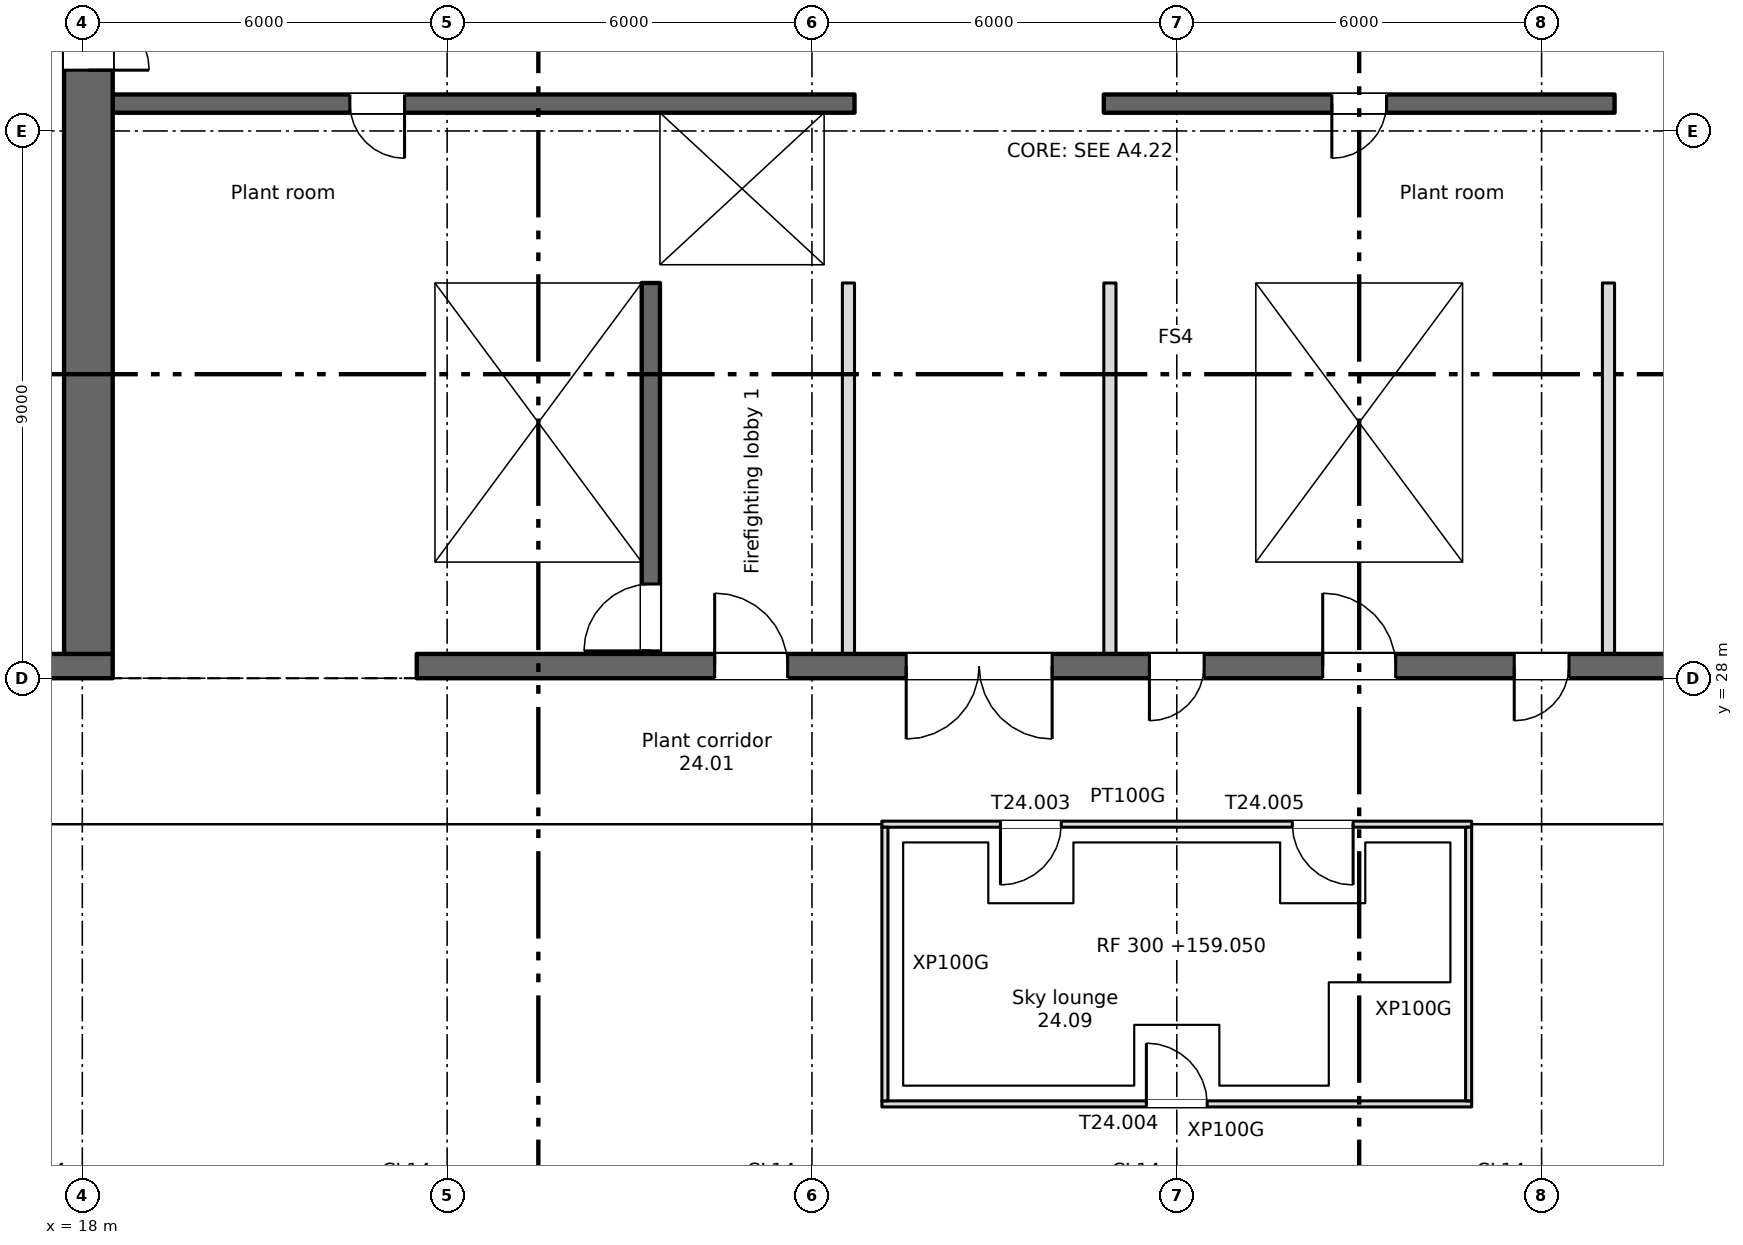
"""IFC4 building model, lengths in metres.
Left out: names, types, materials, properties, quantities, classifications, styles, units other than length and angle.
Written with IfcOpenShell. Run it as: python <this file> out.ifc"""

import sys

from ifc_helpers import new_model, si_unit, direction, frame, frame_2d, origin, place, context, subcontext, project, spatial, rectangle, extrude, element, fill, save


model = new_model("IFC4")
c1 = context("Model", 3, precision=1e-05, world=origin(), true_north=direction((0.0, 1.0)))
c2 = subcontext(c1, "Body", "Model", "MODEL_VIEW")
j1 = project(units=[si_unit("LENGTHUNIT", "METRE"), si_unit("PLANEANGLEUNIT", "RADIAN")], contexts=[c1])
p1 = place(None, origin())
s1 = spatial("IfcSite", under=j1, at=p1, CompositionType="ELEMENT")
p2 = place(p1, origin())
s2 = spatial("IfcBuilding", under=s1, at=p2, CompositionType="ELEMENT")
p3 = place(p2, frame((0.0, 0.0, 158.75)))
s3 = spatial("IfcBuildingStorey", under=s2, at=p3, CompositionType="ELEMENT", Elevation=158.75)
p4 = place(p3, frame((10.0, 28.2, 0.0), z_axis=(0.0, 0.0, 1.0), x_axis=(1.0, 0.0, 0.0)))
e1 = element("IfcWall", 1, at=p4, inside=s3, PredefinedType="SHEAR", context=c2, shape_type="SweptSolid", body=[
    extrude(rectangle(XDim=8.5, YDim=0.4, at=frame_2d((4.25, 0.0))), origin(), (0.0, 0.0, 1.0), 7.2),
])
p5 = place(p4, frame((1.4, 0.0, 0.0)))
e2 = element("IfcOpeningElement", 2, at=p5, cuts=e1, PredefinedType="OPENING", context=c2, shape_type="SweptSolid", body=[
    extrude(rectangle(XDim=1.2, YDim=2.1, at=frame_2d((0.6, 1.05))), frame((0.0, 0.21, 0.0), z_axis=(0.0, -1.0, 0.0), x_axis=(1.0, 0.0, 0.0)), (0.0, 0.0, 1.0), 0.42),
])
p6 = place(p4, frame((4.65, 0.0, 0.0)))
e3 = element("IfcOpeningElement", 3, at=p6, cuts=e1, PredefinedType="OPENING", context=c2, shape_type="SweptSolid", body=[
    extrude(rectangle(XDim=2.4, YDim=2.1, at=frame_2d((1.2, 1.05))), frame((0.0, 0.21, 0.0), z_axis=(0.0, -1.0, 0.0), x_axis=(1.0, 0.0, 0.0)), (0.0, 0.0, 1.0), 0.42),
])
p7 = place(p3, frame((54.5, 28.2, 0.0), z_axis=(0.0, 0.0, 1.0), x_axis=(-1.0, 0.0, 0.0)))
e4 = element("IfcWall", 4, at=p7, inside=s3, PredefinedType="SHEAR", context=c2, shape_type="SweptSolid", body=[
    extrude(rectangle(XDim=31.0, YDim=0.4, at=frame_2d((15.5, 0.0))), origin(), (0.0, 0.0, 1.0), 7.2),
])
p8 = place(p7, frame((14.9, 0.0, 0.0)))
e5 = element("IfcOpeningElement", 5, at=p8, cuts=e4, PredefinedType="OPENING", context=c2, shape_type="SweptSolid", body=[
    extrude(rectangle(XDim=1.2, YDim=2.1, at=frame_2d((0.6, 1.05))), frame((0.0, 0.21, 0.0), z_axis=(0.0, -1.0, 0.0), x_axis=(1.0, 0.0, 0.0)), (0.0, 0.0, 1.0), 0.42),
])
p9 = place(p7, frame((24.9, 0.0, 0.0)))
e6 = element("IfcOpeningElement", 6, at=p9, cuts=e4, PredefinedType="OPENING", context=c2, shape_type="SweptSolid", body=[
    extrude(rectangle(XDim=1.2, YDim=2.1, at=frame_2d((0.6, 1.05))), frame((0.0, 0.21, 0.0), z_axis=(0.0, -1.0, 0.0), x_axis=(1.0, 0.0, 0.0)), (0.0, 0.0, 1.0), 0.42),
])
p10 = place(p7, frame((4.9, 0.0, 0.0)))
e7 = element("IfcOpeningElement", 7, at=p10, cuts=e4, PredefinedType="OPENING", context=c2, shape_type="SweptSolid", body=[
    extrude(rectangle(XDim=1.2, YDim=2.1, at=frame_2d((0.6, 1.05))), frame((0.0, 0.21, 0.0), z_axis=(0.0, -1.0, 0.0), x_axis=(1.0, 0.0, 0.0)), (0.0, 0.0, 1.0), 0.42),
])
p11 = place(p7, frame((20.55, 0.0, 0.0)))
e8 = element("IfcOpeningElement", 8, at=p11, cuts=e4, PredefinedType="OPENING", context=c2, shape_type="SweptSolid", body=[
    extrude(rectangle(XDim=2.4, YDim=2.1, at=frame_2d((1.2, 1.05))), frame((0.0, 0.21, 0.0), z_axis=(0.0, -1.0, 0.0), x_axis=(1.0, 0.0, 0.0)), (0.0, 0.0, 1.0), 0.42),
])
p12 = place(p7, frame((8.05, 0.0, 0.0)))
e9 = element("IfcOpeningElement", 9, at=p12, cuts=e4, PredefinedType="OPENING", context=c2, shape_type="SweptSolid", body=[
    extrude(rectangle(XDim=2.4, YDim=2.1, at=frame_2d((1.2, 1.05))), frame((0.0, 0.21, 0.0), z_axis=(0.0, -1.0, 0.0), x_axis=(1.0, 0.0, 0.0)), (0.0, 0.0, 1.0), 0.42),
])
p13 = place(p7, frame((18.05, 0.0, 0.0)))
e10 = element("IfcOpeningElement", 10, at=p13, cuts=e4, PredefinedType="OPENING", context=c2, shape_type="SweptSolid", body=[
    extrude(rectangle(XDim=0.9, YDim=2.1, at=frame_2d((0.45, 1.05))), frame((0.0, 0.21, 0.0), z_axis=(0.0, -1.0, 0.0), x_axis=(1.0, 0.0, 0.0)), (0.0, 0.0, 1.0), 0.42),
])
p14 = place(p7, frame((12.05, 0.0, 0.0)))
e11 = element("IfcOpeningElement", 11, at=p14, cuts=e4, PredefinedType="OPENING", context=c2, shape_type="SweptSolid", body=[
    extrude(rectangle(XDim=0.9, YDim=2.1, at=frame_2d((0.45, 1.05))), frame((0.0, 0.21, 0.0), z_axis=(0.0, -1.0, 0.0), x_axis=(1.0, 0.0, 0.0)), (0.0, 0.0, 1.0), 0.42),
])
p15 = place(p3, frame((18.1, 28.4, 0.0), z_axis=(0.0, 0.0, 1.0), x_axis=(0.0, 1.0, 0.0)))
e12 = element("IfcWall", 12, at=p15, inside=s3, PredefinedType="SHEAR", context=c2, shape_type="SweptSolid", body=[
    extrude(rectangle(XDim=16.8, YDim=0.8, at=frame_2d((8.4, 0.0))), origin(), (0.0, 0.0, 1.0), 7.2),
])
p16 = place(p15, frame((9.6, 0.0, 0.0)))
e13 = element("IfcOpeningElement", 13, at=p16, cuts=e12, PredefinedType="OPENING", context=c2, shape_type="SweptSolid", body=[
    extrude(rectangle(XDim=2.0, YDim=2.1, at=frame_2d((1.0, 1.05))), frame((0.0, 0.41, 0.0), z_axis=(0.0, -1.0, 0.0), x_axis=(1.0, 0.0, 0.0)), (0.0, 0.0, 1.0), 0.82),
])
p17 = place(p15, frame((15.35, 0.0, 0.0)))
e14 = element("IfcOpeningElement", 14, at=p17, cuts=e12, PredefinedType="OPENING", context=c2, shape_type="SweptSolid", body=[
    extrude(rectangle(XDim=1.2, YDim=2.1, at=frame_2d((0.6, 1.05))), frame((0.0, 0.41, 0.0), z_axis=(0.0, -1.0, 0.0), x_axis=(1.0, 0.0, 0.0)), (0.0, 0.0, 1.0), 0.82),
])
p18 = place(p3, frame((23.65, 28.4, 0.0), z_axis=(0.0, 0.0, 1.0), x_axis=(0.0, 1.0, 0.0)))
e15 = element("IfcWall", 15, at=p18, inside=s3, PredefinedType="SHEAR", context=c2, shape_type="SweptSolid", body=[
    extrude(rectangle(XDim=6.1, YDim=0.3, at=frame_2d((3.05, 0.0))), origin(), (0.0, 0.0, 1.0), 7.2),
])
p19 = place(p3, frame((27.35, 28.4, 0.0), z_axis=(0.0, 0.0, 1.0), x_axis=(0.0, 1.0, 0.0)))
e16 = element("IfcWall", 16, at=p19, inside=s3, PredefinedType="SHEAR", context=c2, shape_type="SweptSolid", body=[
    extrude(rectangle(XDim=6.1, YDim=0.3, at=frame_2d((3.05, 0.0))), origin(), (0.0, 0.0, 1.0), 7.2),
])
p20 = place(p19, frame((0.05, 0.0, 0.0)))
e17 = element("IfcOpeningElement", 17, at=p20, cuts=e16, PredefinedType="OPENING", context=c2, shape_type="SweptSolid", body=[
    extrude(rectangle(XDim=1.1, YDim=2.1, at=frame_2d((0.55, 1.05))), frame((0.0, 0.16, 0.0), z_axis=(0.0, -1.0, 0.0), x_axis=(1.0, 0.0, 0.0)), (0.0, 0.0, 1.0), 0.32),
])
for number, where, z_axis, x_axis in (
    (18, (37.15, 28.4, 0.0), (0.0, 0.0, 1.0), (0.0, 1.0, 0.0)),
    (19, (40.85, 28.4, 0.0), (0.0, 0.0, 1.0), (0.0, 1.0, 0.0)),
):
    element("IfcWall", number, at=place(p3, frame(where, z_axis=z_axis, x_axis=x_axis)), inside=s3, PredefinedType="SHEAR", context=c2, shape_type="SweptSolid", body=[
        extrude(rectangle(XDim=6.1, YDim=0.3, at=frame_2d((3.05, 0.0))), origin(), (0.0, 0.0, 1.0), 7.2),
    ])
p21 = place(p3, frame((18.5, 34.65, 0.0), z_axis=(0.0, 0.0, 1.0), x_axis=(1.0, 0.0, 0.0)))
e20 = element("IfcWall", 20, at=p21, inside=s3, PredefinedType="SHEAR", context=c2, shape_type="SweptSolid", body=[
    extrude(rectangle(XDim=12.2, YDim=0.3, at=frame_2d((6.1, 0.0))), origin(), (0.0, 0.0, 1.0), 7.2),
])
p22 = place(p21, frame((9.8, 0.0, 0.0)))
e21 = element("IfcOpeningElement", 21, at=p22, cuts=e20, PredefinedType="OPENING", context=c2, shape_type="SweptSolid", body=[
    extrude(rectangle(XDim=1.1, YDim=2.1, at=frame_2d((0.55, 1.05))), frame((0.0, 0.16, 0.0), z_axis=(0.0, -1.0, 0.0), x_axis=(1.0, 0.0, 0.0)), (0.0, 0.0, 1.0), 0.32),
])
p23 = place(p3, frame((34.8, 34.65, 0.0), z_axis=(0.0, 0.0, 1.0), x_axis=(1.0, 0.0, 0.0)))
e22 = element("IfcWall", 22, at=p23, inside=s3, PredefinedType="SHEAR", context=c2, shape_type="SweptSolid", body=[
    extrude(rectangle(XDim=8.4, YDim=0.3, at=frame_2d((4.2, 0.0))), origin(), (0.0, 0.0, 1.0), 7.2),
])
p24 = place(p3, frame((30.7, 37.45, 0.0), z_axis=(0.0, 0.0, 1.0), x_axis=(-1.0, 0.0, 0.0)))
e23 = element("IfcWall", 23, at=p24, inside=s3, PredefinedType="SHEAR", context=c2, shape_type="SweptSolid", body=[
    extrude(rectangle(XDim=12.2, YDim=0.3, at=frame_2d((6.1, 0.0))), origin(), (0.0, 0.0, 1.0), 7.2),
])
p25 = place(p24, frame((7.4, 0.0, 0.0)))
e24 = element("IfcOpeningElement", 24, at=p25, cuts=e23, PredefinedType="OPENING", context=c2, shape_type="SweptSolid", body=[
    extrude(rectangle(XDim=0.9, YDim=2.1, at=frame_2d((0.45, 1.05))), frame((0.0, 0.16, 0.0), z_axis=(0.0, -1.0, 0.0), x_axis=(1.0, 0.0, 0.0)), (0.0, 0.0, 1.0), 0.32),
])
p26 = place(p3, frame((43.2, 37.45, 0.0), z_axis=(0.0, 0.0, 1.0), x_axis=(-1.0, 0.0, 0.0)))
e25 = element("IfcWall", 25, at=p26, inside=s3, PredefinedType="SHEAR", context=c2, shape_type="SweptSolid", body=[
    extrude(rectangle(XDim=8.4, YDim=0.3, at=frame_2d((4.2, 0.0))), origin(), (0.0, 0.0, 1.0), 7.2),
])
p27 = place(p26, frame((3.75, 0.0, 0.0)))
e26 = element("IfcOpeningElement", 26, at=p27, cuts=e25, PredefinedType="OPENING", context=c2, shape_type="SweptSolid", body=[
    extrude(rectangle(XDim=0.9, YDim=2.1, at=frame_2d((0.45, 1.05))), frame((0.0, 0.16, 0.0), z_axis=(0.0, -1.0, 0.0), x_axis=(1.0, 0.0, 0.0)), (0.0, 0.0, 1.0), 0.32),
])
p28 = place(p3, frame((27.35, 34.8, 0.0), z_axis=(0.0, 0.0, 1.0), x_axis=(0.0, 1.0, 0.0)))
e27 = element("IfcWall", 27, at=p28, inside=s3, PredefinedType="SHEAR", context=c2, shape_type="SweptSolid", body=[
    extrude(rectangle(XDim=2.5, YDim=0.3, at=frame_2d((1.25, 0.0))), origin(), (0.0, 0.0, 1.0), 7.2),
])
p29 = place(p3, frame((30.45, 34.8, 0.0), z_axis=(0.0, 0.0, 1.0), x_axis=(0.0, 1.0, 0.0)))
e28 = element("IfcWall", 28, at=p29, inside=s3, PredefinedType="SHEAR", context=c2, shape_type="SweptSolid", body=[
    extrude(rectangle(XDim=2.5, YDim=0.5, at=frame_2d((1.25, 0.0))), origin(), (0.0, 0.0, 1.0), 7.2),
])
for number, where, z_axis, x_axis in (
    (29, (34.95, 34.8, 0.0), (0.0, 0.0, 1.0), (0.0, 1.0, 0.0)),
    (30, (43.05, 34.8, 0.0), (0.0, 0.0, 1.0), (0.0, 1.0, 0.0)),
):
    element("IfcWall", number, at=place(p3, frame(where, z_axis=z_axis, x_axis=x_axis)), inside=s3, PredefinedType="SHEAR", context=c2, shape_type="SweptSolid", body=[
        extrude(rectangle(XDim=2.5, YDim=0.3, at=frame_2d((1.25, 0.0))), origin(), (0.0, 0.0, 1.0), 7.2),
    ])
for number, where, z_axis, x_axis in (
    (31, (30.6, 28.4, 0.0), (0.0, 0.0, 1.0), (0.0, 1.0, 0.0)),
    (32, (34.9, 28.4, 0.0), (0.0, 0.0, 1.0), (0.0, 1.0, 0.0)),
    (33, (43.1, 28.4, 0.0), (0.0, 0.0, 1.0), (0.0, 1.0, 0.0)),
):
    element("IfcWall", number, at=place(p3, frame(where, z_axis=z_axis, x_axis=x_axis)), inside=s3, PredefinedType="PARTITIONING", context=c2, shape_type="SweptSolid", body=[
        extrude(rectangle(XDim=6.1, YDim=0.2, at=frame_2d((3.05, 0.0))), origin(), (0.0, 0.0, 1.0), 7.2),
    ])
p30 = place(p3, frame((31.15, 21.0, 0.0), z_axis=(0.0, 0.0, 1.0), x_axis=(1.0, 0.0, 0.0)))
e34 = element("IfcWall", 34, at=p30, inside=s3, PredefinedType="PARTITIONING", context=c2, shape_type="SweptSolid", body=[
    extrude(rectangle(XDim=9.7, YDim=0.1, at=frame_2d((4.85, 0.0))), origin(), (0.0, 0.0, 1.0), 7.2),
])
p31 = place(p30, frame((4.35, 0.0, 0.0)))
e35 = element("IfcOpeningElement", 35, at=p31, cuts=e34, PredefinedType="OPENING", context=c2, shape_type="SweptSolid", body=[
    extrude(rectangle(XDim=1.0, YDim=2.1, at=frame_2d((0.5, 1.05))), frame((0.0, 0.06, 0.0), z_axis=(0.0, -1.0, 0.0), x_axis=(1.0, 0.0, 0.0)), (0.0, 0.0, 1.0), 0.12),
])
p32 = place(p3, frame((31.15, 25.6, 0.0), z_axis=(0.0, 0.0, 1.0), x_axis=(1.0, 0.0, 0.0)))
e36 = element("IfcWall", 36, at=p32, inside=s3, PredefinedType="PARTITIONING", context=c2, shape_type="SweptSolid", body=[
    extrude(rectangle(XDim=9.7, YDim=0.1, at=frame_2d((4.85, 0.0))), origin(), (0.0, 0.0, 1.0), 7.2),
])
p33 = place(p32, frame((1.95, 0.0, 0.0)))
e37 = element("IfcOpeningElement", 37, at=p33, cuts=e36, PredefinedType="OPENING", context=c2, shape_type="SweptSolid", body=[
    extrude(rectangle(XDim=1.0, YDim=2.1, at=frame_2d((0.5, 1.05))), frame((0.0, 0.06, 0.0), z_axis=(0.0, -1.0, 0.0), x_axis=(1.0, 0.0, 0.0)), (0.0, 0.0, 1.0), 0.12),
])
p34 = place(p32, frame((6.75, 0.0, 0.0)))
e38 = element("IfcOpeningElement", 38, at=p34, cuts=e36, PredefinedType="OPENING", context=c2, shape_type="SweptSolid", body=[
    extrude(rectangle(XDim=1.0, YDim=2.1, at=frame_2d((0.5, 1.05))), frame((0.0, 0.06, 0.0), z_axis=(0.0, -1.0, 0.0), x_axis=(1.0, 0.0, 0.0)), (0.0, 0.0, 1.0), 0.12),
])
for number, where, z_axis, x_axis in (
    (39, (31.2, 21.05, 0.0), (0.0, 0.0, 1.0), (0.0, 1.0, 0.0)),
    (40, (40.8, 21.05, 0.0), (0.0, 0.0, 1.0), (0.0, 1.0, 0.0)),
):
    element("IfcWall", number, at=place(p3, frame(where, z_axis=z_axis, x_axis=x_axis)), inside=s3, PredefinedType="PARTITIONING", context=c2, shape_type="SweptSolid", body=[
        extrude(rectangle(XDim=4.5, YDim=0.1, at=frame_2d((2.25, 0.0))), origin(), (0.0, 0.0, 1.0), 7.2),
    ])
p35 = place(p25, origin())
e41 = element("IfcDoor", 41, at=p35, inside=s3, OperationType="SINGLE_SWING_LEFT", PredefinedType="DOOR", context=c2, shape_type="SweptSolid", body=[
    extrude(rectangle(XDim=0.9, YDim=2.1, at=frame_2d((0.45, 1.05))), frame((0.0, 0.025, 0.0), z_axis=(0.0, -1.0, 0.0), x_axis=(1.0, 0.0, 0.0)), (0.0, 0.0, 1.0), 0.05),
])
fill(e24, e41)
p36 = place(p27, origin())
e42 = element("IfcDoor", 42, at=p36, inside=s3, OperationType="SINGLE_SWING_RIGHT", PredefinedType="DOOR", context=c2, shape_type="SweptSolid", body=[
    extrude(rectangle(XDim=0.9, YDim=2.1, at=frame_2d((0.45, 1.05))), frame((0.0, 0.025, 0.0), z_axis=(0.0, -1.0, 0.0), x_axis=(1.0, 0.0, 0.0)), (0.0, 0.0, 1.0), 0.05),
])
fill(e26, e42)
p37 = place(p22, origin())
e43 = element("IfcDoor", 43, at=p37, inside=s3, OperationType="SLIDING_TO_LEFT", PredefinedType="DOOR", context=c2, shape_type="SweptSolid", body=[
    extrude(rectangle(XDim=1.1, YDim=2.1, at=frame_2d((0.55, 1.05))), frame((0.0, 0.025, 0.0), z_axis=(0.0, -1.0, 0.0), x_axis=(1.0, 0.0, 0.0)), (0.0, 0.0, 1.0), 0.05),
])
fill(e21, e43)
p38 = place(p20, origin())
e44 = element("IfcDoor", 44, at=p38, inside=s3, OperationType="SINGLE_SWING_LEFT", PredefinedType="DOOR", context=c2, shape_type="SweptSolid", body=[
    extrude(rectangle(XDim=1.1, YDim=2.1, at=frame_2d((0.55, 1.05))), frame((0.0, 0.025, 0.0), z_axis=(0.0, -1.0, 0.0), x_axis=(1.0, 0.0, 0.0)), (0.0, 0.0, 1.0), 0.05),
])
fill(e17, e44)
p39 = place(p8, origin())
e45 = element("IfcDoor", 45, at=p39, inside=s3, OperationType="SINGLE_SWING_RIGHT", PredefinedType="DOOR", context=c2, shape_type="SweptSolid", body=[
    extrude(rectangle(XDim=1.2, YDim=2.1, at=frame_2d((0.6, 1.05))), frame((0.0, 0.025, 0.0), z_axis=(0.0, -1.0, 0.0), x_axis=(1.0, 0.0, 0.0)), (0.0, 0.0, 1.0), 0.05),
])
fill(e5, e45)
p40 = place(p9, origin())
e46 = element("IfcDoor", 46, at=p40, inside=s3, OperationType="SINGLE_SWING_RIGHT", PredefinedType="DOOR", context=c2, shape_type="SweptSolid", body=[
    extrude(rectangle(XDim=1.2, YDim=2.1, at=frame_2d((0.6, 1.05))), frame((0.0, 0.025, 0.0), z_axis=(0.0, -1.0, 0.0), x_axis=(1.0, 0.0, 0.0)), (0.0, 0.0, 1.0), 0.05),
])
fill(e6, e46)
p41 = place(p11, origin())
e47 = element("IfcDoor", 47, at=p41, inside=s3, OperationType="DOUBLE_DOOR_SINGLE_SWING", PredefinedType="DOOR", context=c2, shape_type="SweptSolid", body=[
    extrude(rectangle(XDim=2.4, YDim=2.1, at=frame_2d((1.2, 1.05))), frame((0.0, 0.025, 0.0), z_axis=(0.0, -1.0, 0.0), x_axis=(1.0, 0.0, 0.0)), (0.0, 0.0, 1.0), 0.05),
])
fill(e8, e47)
p42 = place(p13, origin())
e48 = element("IfcDoor", 48, at=p42, inside=s3, OperationType="SINGLE_SWING_RIGHT", PredefinedType="DOOR", context=c2, shape_type="SweptSolid", body=[
    extrude(rectangle(XDim=0.9, YDim=2.1, at=frame_2d((0.45, 1.05))), frame((0.0, 0.025, 0.0), z_axis=(0.0, -1.0, 0.0), x_axis=(1.0, 0.0, 0.0)), (0.0, 0.0, 1.0), 0.05),
])
fill(e10, e48)
p43 = place(p14, origin())
e49 = element("IfcDoor", 49, at=p43, inside=s3, OperationType="SINGLE_SWING_RIGHT", PredefinedType="DOOR", context=c2, shape_type="SweptSolid", body=[
    extrude(rectangle(XDim=0.9, YDim=2.1, at=frame_2d((0.45, 1.05))), frame((0.0, 0.025, 0.0), z_axis=(0.0, -1.0, 0.0), x_axis=(1.0, 0.0, 0.0)), (0.0, 0.0, 1.0), 0.05),
])
fill(e11, e49)
p44 = place(p16, origin())
e50 = element("IfcDoor", 50, at=p44, inside=s3, OperationType="DOUBLE_DOOR_SINGLE_SWING", PredefinedType="DOOR", context=c2, shape_type="SweptSolid", body=[
    extrude(rectangle(XDim=2.0, YDim=2.1, at=frame_2d((1.0, 1.05))), frame((0.0, 0.025, 0.0), z_axis=(0.0, -1.0, 0.0), x_axis=(1.0, 0.0, 0.0)), (0.0, 0.0, 1.0), 0.05),
])
fill(e13, e50)
p45 = place(p33, origin())
e51 = element("IfcDoor", 51, at=p45, inside=s3, OperationType="SINGLE_SWING_LEFT", PredefinedType="DOOR", context=c2, shape_type="SweptSolid", body=[
    extrude(rectangle(XDim=1.0, YDim=2.1, at=frame_2d((0.5, 1.05))), frame((0.0, 0.025, 0.0), z_axis=(0.0, -1.0, 0.0), x_axis=(1.0, 0.0, 0.0)), (0.0, 0.0, 1.0), 0.05),
])
fill(e37, e51)
p46 = place(p31, origin())
e52 = element("IfcDoor", 52, at=p46, inside=s3, OperationType="SINGLE_SWING_LEFT", PredefinedType="DOOR", context=c2, shape_type="SweptSolid", body=[
    extrude(rectangle(XDim=1.0, YDim=2.1, at=frame_2d((0.5, 1.05))), frame((0.0, 0.025, 0.0), z_axis=(0.0, -1.0, 0.0), x_axis=(1.0, 0.0, 0.0)), (0.0, 0.0, 1.0), 0.05),
])
fill(e35, e52)
p47 = place(p34, origin())
e53 = element("IfcDoor", 53, at=p47, inside=s3, OperationType="SINGLE_SWING_RIGHT", PredefinedType="DOOR", context=c2, shape_type="SweptSolid", body=[
    extrude(rectangle(XDim=1.0, YDim=2.1, at=frame_2d((0.5, 1.05))), frame((0.0, 0.025, 0.0), z_axis=(0.0, -1.0, 0.0), x_axis=(1.0, 0.0, 0.0)), (0.0, 0.0, 1.0), 0.05),
])
fill(e38, e53)
save(model, sys.argv[1])
